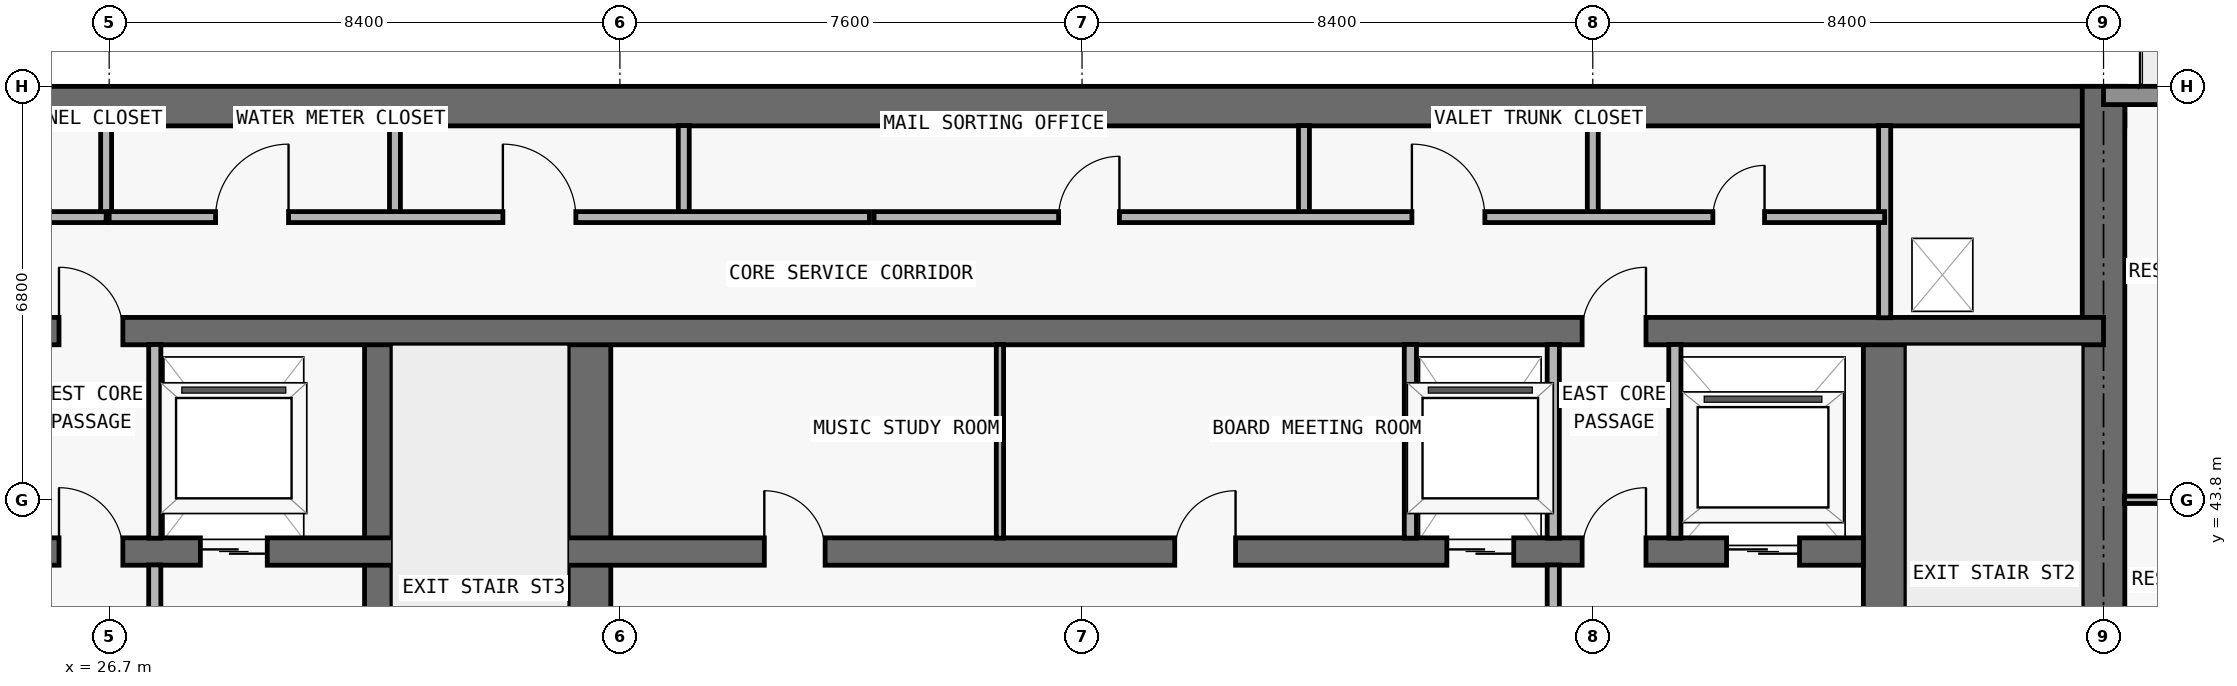
"""IFC4 building model, lengths in metres.
Left out: names, types, materials, properties, quantities, classifications, styles, units other than length and angle.
Written with IfcOpenShell. Run it as: python <this file> out.ifc"""

import sys

from ifc_helpers import new_model, si_unit, direction, frame, frame_2d, origin, place, context, subcontext, project, spatial, rectangle, extrude, element, fill, save


model = new_model("IFC4")
c1 = context("Model", 3, precision=1e-05, world=origin(), true_north=direction((0.0, 1.0)))
c2 = subcontext(c1, "Body", "Model", "MODEL_VIEW")
j1 = project(units=[si_unit("LENGTHUNIT", "METRE"), si_unit("PLANEANGLEUNIT", "RADIAN")], contexts=[c1])
p1 = place(None, origin())
s1 = spatial("IfcSite", under=j1, at=p1, CompositionType="ELEMENT")
p2 = place(p1, origin())
s2 = spatial("IfcBuilding", under=s1, at=p2, CompositionType="ELEMENT")
p3 = place(p2, frame((0.0, 0.0, 229.8)))
s3 = spatial("IfcBuildingStorey", under=s2, at=p3, CompositionType="ELEMENT", Elevation=229.8)
p4 = place(p3, frame((17.95, 50.275, 0.0), z_axis=(0.0, 0.0, 1.0), x_axis=(1.0, 0.0, 0.0)))
e1 = element("IfcWall", 1, at=p4, inside=s3, PredefinedType="SHEAR", context=c2, shape_type="SweptSolid", body=[
    extrude(rectangle(XDim=41.9, YDim=0.65, at=frame_2d((20.95, 0.0))), origin(), (0.0, 0.0, 1.0), 3.05),
])
p5 = place(p3, frame((59.5, 36.65, 0.0), z_axis=(0.0, 0.0, 1.0), x_axis=(0.0, 1.0, 0.0)))
e2 = element("IfcWall", 2, at=p5, inside=s3, PredefinedType="SHEAR", context=c2, shape_type="SweptSolid", body=[
    extrude(rectangle(XDim=13.95, YDim=0.7, at=frame_2d((6.975, 0.0))), origin(), (0.0, 0.0, 1.0), 3.05),
])
p6 = place(p3, frame((55.9, 37.0, 0.0), z_axis=(0.0, 0.0, 1.0), x_axis=(0.0, 1.0, 0.0)))
e3 = element("IfcWall", 3, at=p6, inside=s3, PredefinedType="SHEAR", context=c2, shape_type="SweptSolid", body=[
    extrude(rectangle(XDim=9.575, YDim=0.7, at=frame_2d((4.788, 0.0))), origin(), (0.0, 0.0, 1.0), 3.05),
])
p7 = place(p6, frame((0.55, 0.0, 0.0)))
e4 = element("IfcOpeningElement", 4, at=p7, cuts=e3, PredefinedType="OPENING", context=c2, shape_type="SweptSolid", body=[
    extrude(rectangle(XDim=1.1, YDim=2.15, at=frame_2d((0.55, 1.075))), frame((0.0, 0.36, 0.0), z_axis=(0.0, -1.0, 0.0), x_axis=(1.0, 0.0, 0.0)), (0.0, 0.0, 1.0), 0.72),
])
p8 = place(p3, frame((31.125, 37.0, 0.0), z_axis=(0.0, 0.0, 1.0), x_axis=(0.0, 1.0, 0.0)))
e5 = element("IfcWall", 5, at=p8, inside=s3, PredefinedType="SHEAR", context=c2, shape_type="SweptSolid", body=[
    extrude(rectangle(XDim=9.575, YDim=0.45, at=frame_2d((4.788, 0.0))), origin(), (0.0, 0.0, 1.0), 3.05),
])
p9 = place(p3, frame((34.6, 37.0, 0.0), z_axis=(0.0, 0.0, 1.0), x_axis=(0.0, 1.0, 0.0)))
e6 = element("IfcWall", 6, at=p9, inside=s3, PredefinedType="SHEAR", context=c2, shape_type="SweptSolid", body=[
    extrude(rectangle(XDim=9.575, YDim=0.7, at=frame_2d((4.788, 0.0))), origin(), (0.0, 0.0, 1.0), 3.05),
])
p10 = place(p3, frame((22.25, 42.95, 0.0), z_axis=(0.0, 0.0, 1.0), x_axis=(1.0, 0.0, 0.0)))
e7 = element("IfcWall", 7, at=p10, inside=s3, PredefinedType="SHEAR", context=c2, shape_type="SweptSolid", body=[
    extrude(rectangle(XDim=33.3, YDim=0.45, at=frame_2d((16.65, 0.0))), origin(), (0.0, 0.0, 1.0), 3.05),
])
p11 = place(p10, frame((1.05, 0.0, 0.0)))
e8 = element("IfcOpeningElement", 8, at=p11, cuts=e7, PredefinedType="OPENING", context=c2, shape_type="SweptSolid", body=[
    extrude(rectangle(XDim=1.2, YDim=2.2, at=frame_2d((0.6, 1.1))), frame((0.0, 0.235, 0.0), z_axis=(0.0, -1.0, 0.0), x_axis=(1.0, 0.0, 0.0)), (0.0, 0.0, 1.0), 0.47),
])
p12 = place(p10, frame((31.05, 0.0, 0.0)))
e9 = element("IfcOpeningElement", 9, at=p12, cuts=e7, PredefinedType="OPENING", context=c2, shape_type="SweptSolid", body=[
    extrude(rectangle(XDim=1.2, YDim=2.2, at=frame_2d((0.6, 1.1))), frame((0.0, 0.235, 0.0), z_axis=(0.0, -1.0, 0.0), x_axis=(1.0, 0.0, 0.0)), (0.0, 0.0, 1.0), 0.47),
])
p13 = place(p10, frame((26.45, 0.0, 0.0)))
e10 = element("IfcOpeningElement", 10, at=p13, cuts=e7, PredefinedType="OPENING", context=c2, shape_type="SweptSolid", body=[
    extrude(rectangle(XDim=1.1, YDim=2.2, at=frame_2d((0.55, 1.1))), frame((0.0, 0.235, 0.0), z_axis=(0.0, -1.0, 0.0), x_axis=(1.0, 0.0, 0.0)), (0.0, 0.0, 1.0), 0.47),
])
p14 = place(p10, frame((5.95, 0.0, 0.0)))
e11 = element("IfcOpeningElement", 11, at=p14, cuts=e7, PredefinedType="OPENING", context=c2, shape_type="SweptSolid", body=[
    extrude(rectangle(XDim=1.1, YDim=2.2, at=frame_2d((0.55, 1.1))), frame((0.0, 0.235, 0.0), z_axis=(0.0, -1.0, 0.0), x_axis=(1.0, 0.0, 0.0)), (0.0, 0.0, 1.0), 0.47),
])
p15 = place(p10, frame((3.625, 0.0, 0.0)))
e12 = element("IfcOpeningElement", 12, at=p15, cuts=e7, PredefinedType="OPENING", context=c2, shape_type="SweptSolid", body=[
    extrude(rectangle(XDim=1.05, YDim=2.15, at=frame_2d((0.525, 1.075))), frame((0.0, 0.235, 0.0), z_axis=(0.0, -1.0, 0.0), x_axis=(1.0, 0.0, 0.0)), (0.0, 0.0, 1.0), 0.47),
])
p16 = place(p10, frame((28.675, 0.0, 0.0)))
e13 = element("IfcOpeningElement", 13, at=p16, cuts=e7, PredefinedType="OPENING", context=c2, shape_type="SweptSolid", body=[
    extrude(rectangle(XDim=1.05, YDim=2.15, at=frame_2d((0.525, 1.075))), frame((0.0, 0.235, 0.0), z_axis=(0.0, -1.0, 0.0), x_axis=(1.0, 0.0, 0.0)), (0.0, 0.0, 1.0), 0.47),
])
p17 = place(p10, frame((15.225, 0.0, 0.0)))
e14 = element("IfcOpeningElement", 14, at=p17, cuts=e7, PredefinedType="OPENING", context=c2, shape_type="SweptSolid", body=[
    extrude(rectangle(XDim=1.0, YDim=2.2, at=frame_2d((0.5, 1.1))), frame((0.0, 0.235, 0.0), z_axis=(0.0, -1.0, 0.0), x_axis=(1.0, 0.0, 0.0)), (0.0, 0.0, 1.0), 0.47),
])
p18 = place(p10, frame((21.975, 0.0, 0.0)))
e15 = element("IfcOpeningElement", 15, at=p18, cuts=e7, PredefinedType="OPENING", context=c2, shape_type="SweptSolid", body=[
    extrude(rectangle(XDim=1.0, YDim=2.2, at=frame_2d((0.5, 1.1))), frame((0.0, 0.235, 0.0), z_axis=(0.0, -1.0, 0.0), x_axis=(1.0, 0.0, 0.0)), (0.0, 0.0, 1.0), 0.47),
])
p19 = place(p3, frame((18.3, 46.575, 0.0), z_axis=(0.0, 0.0, 1.0), x_axis=(1.0, 0.0, 0.0)))
e16 = element("IfcWall", 16, at=p19, inside=s3, PredefinedType="SHEAR", context=c2, shape_type="SweptSolid", body=[
    extrude(rectangle(XDim=41.2, YDim=0.45, at=frame_2d((20.6, 0.0))), origin(), (0.0, 0.0, 1.0), 3.05),
])
p20 = place(p19, frame((7.575, 0.0, 0.0)))
e17 = element("IfcOpeningElement", 17, at=p20, cuts=e16, PredefinedType="OPENING", context=c2, shape_type="SweptSolid", body=[
    extrude(rectangle(XDim=1.05, YDim=2.15, at=frame_2d((0.525, 1.075))), frame((0.0, 0.235, 0.0), z_axis=(0.0, -1.0, 0.0), x_axis=(1.0, 0.0, 0.0)), (0.0, 0.0, 1.0), 0.47),
])
p21 = place(p19, frame((32.625, 0.0, 0.0)))
e18 = element("IfcOpeningElement", 18, at=p21, cuts=e16, PredefinedType="OPENING", context=c2, shape_type="SweptSolid", body=[
    extrude(rectangle(XDim=1.05, YDim=2.15, at=frame_2d((0.525, 1.075))), frame((0.0, 0.235, 0.0), z_axis=(0.0, -1.0, 0.0), x_axis=(1.0, 0.0, 0.0)), (0.0, 0.0, 1.0), 0.47),
])
p22 = place(p3, frame((59.5, 50.45, 0.0), z_axis=(0.0, 0.0, 1.0), x_axis=(1.0, 0.0, 0.0)))
e19 = element("IfcWall", 19, at=p22, inside=s3, PredefinedType="STANDARD", context=c2, shape_type="SweptSolid", body=[
    extrude(rectangle(XDim=6.2, YDim=0.3, at=frame_2d((3.1, 0.0))), origin(), (0.0, 0.0, 1.0), 3.05),
])
p23 = place(p22, frame((2.1, 0.0, 0.0)))
e20 = element("IfcOpeningElement", 20, at=p23, cuts=e19, PredefinedType="OPENING", context=c2, shape_type="SweptSolid", body=[
    extrude(rectangle(XDim=2.0, YDim=2.3, at=frame_2d((1.0, 1.15))), frame((0.0, 0.16, 0.0), z_axis=(0.0, -1.0, 0.0), x_axis=(1.0, 0.0, 0.0)), (0.0, 0.0, 1.0), 0.32),
])
p24 = place(p3, frame((26.65, 48.45, 0.0), z_axis=(0.0, 0.0, 1.0), x_axis=(0.0, 1.0, 0.0)))
e21 = element("IfcWall", 21, at=p24, inside=s3, PredefinedType="PARTITIONING", context=c2, shape_type="SweptSolid", body=[
    extrude(rectangle(XDim=1.505, YDim=0.18, at=frame_2d((0.752, 0.0))), origin(), (0.0, 0.0, 1.0), 3.05),
])
p25 = place(p3, frame((27.45, 37.345, 0.0), z_axis=(0.0, 0.0, 1.0), x_axis=(0.0, 1.0, 0.0)))
e22 = element("IfcWall", 22, at=p25, inside=s3, PredefinedType="PARTITIONING", context=c2, shape_type="SweptSolid", body=[
    extrude(rectangle(XDim=5.385, YDim=0.2, at=frame_2d((2.692, 0.0))), origin(), (0.0, 0.0, 1.0), 3.05),
])
p26 = place(p3, frame((27.45, 43.17, 0.0), z_axis=(0.0, 0.0, 1.0), x_axis=(0.0, 1.0, 0.0)))
e23 = element("IfcWall", 23, at=p26, inside=s3, PredefinedType="PARTITIONING", context=c2, shape_type="SweptSolid", body=[
    extrude(rectangle(XDim=3.185, YDim=0.2, at=frame_2d((1.593, 0.0))), origin(), (0.0, 0.0, 1.0), 3.05),
])
for number, where, z_axis, x_axis in (
    (24, (31.4, 48.45, 0.0), (0.0, 0.0, 1.0), (0.0, 1.0, 0.0)),
    (25, (36.15, 48.45, 0.0), (0.0, 0.0, 1.0), (0.0, 1.0, 0.0)),
):
    element("IfcWall", number, at=place(p3, frame(where, z_axis=z_axis, x_axis=x_axis)), inside=s3, PredefinedType="PARTITIONING", context=c2, shape_type="SweptSolid", body=[
        extrude(rectangle(XDim=1.505, YDim=0.18, at=frame_2d((0.752, 0.0))), origin(), (0.0, 0.0, 1.0), 3.05),
    ])
p27 = place(p3, frame((41.35, 43.17, 0.0), z_axis=(0.0, 0.0, 1.0), x_axis=(0.0, 1.0, 0.0)))
e26 = element("IfcWall", 26, at=p27, inside=s3, PredefinedType="PARTITIONING", context=c2, shape_type="SweptSolid", body=[
    extrude(rectangle(XDim=3.185, YDim=0.12, at=frame_2d((1.593, 0.0))), origin(), (0.0, 0.0, 1.0), 3.05),
])
p28 = place(p3, frame((46.35, 48.45, 0.0), z_axis=(0.0, 0.0, 1.0), x_axis=(0.0, 1.0, 0.0)))
e27 = element("IfcWall", 27, at=p28, inside=s3, PredefinedType="PARTITIONING", context=c2, shape_type="SweptSolid", body=[
    extrude(rectangle(XDim=1.505, YDim=0.18, at=frame_2d((0.752, 0.0))), origin(), (0.0, 0.0, 1.0), 3.05),
])
p29 = place(p3, frame((48.1, 43.17, 0.0), z_axis=(0.0, 0.0, 1.0), x_axis=(0.0, 1.0, 0.0)))
e28 = element("IfcWall", 28, at=p29, inside=s3, PredefinedType="PARTITIONING", context=c2, shape_type="SweptSolid", body=[
    extrude(rectangle(XDim=3.185, YDim=0.2, at=frame_2d((1.593, 0.0))), origin(), (0.0, 0.0, 1.0), 3.05),
])
p30 = place(p3, frame((50.45, 37.345, 0.0), z_axis=(0.0, 0.0, 1.0), x_axis=(0.0, 1.0, 0.0)))
e29 = element("IfcWall", 29, at=p30, inside=s3, PredefinedType="PARTITIONING", context=c2, shape_type="SweptSolid", body=[
    extrude(rectangle(XDim=5.385, YDim=0.2, at=frame_2d((2.692, 0.0))), origin(), (0.0, 0.0, 1.0), 3.05),
])
p31 = place(p3, frame((50.45, 43.17, 0.0), z_axis=(0.0, 0.0, 1.0), x_axis=(0.0, 1.0, 0.0)))
e30 = element("IfcWall", 30, at=p31, inside=s3, PredefinedType="PARTITIONING", context=c2, shape_type="SweptSolid", body=[
    extrude(rectangle(XDim=3.185, YDim=0.2, at=frame_2d((1.593, 0.0))), origin(), (0.0, 0.0, 1.0), 3.05),
])
p32 = place(p3, frame((51.1, 48.45, 0.0), z_axis=(0.0, 0.0, 1.0), x_axis=(0.0, 1.0, 0.0)))
e31 = element("IfcWall", 31, at=p32, inside=s3, PredefinedType="PARTITIONING", context=c2, shape_type="SweptSolid", body=[
    extrude(rectangle(XDim=1.505, YDim=0.18, at=frame_2d((0.752, 0.0))), origin(), (0.0, 0.0, 1.0), 3.05),
])
p33 = place(p3, frame((52.45, 43.17, 0.0), z_axis=(0.0, 0.0, 1.0), x_axis=(0.0, 1.0, 0.0)))
e32 = element("IfcWall", 32, at=p33, inside=s3, PredefinedType="PARTITIONING", context=c2, shape_type="SweptSolid", body=[
    extrude(rectangle(XDim=3.185, YDim=0.2, at=frame_2d((1.593, 0.0))), origin(), (0.0, 0.0, 1.0), 3.05),
])
p34 = place(p3, frame((55.9, 46.795, 0.0), z_axis=(0.0, 0.0, 1.0), x_axis=(0.0, 1.0, 0.0)))
e33 = element("IfcWall", 33, at=p34, inside=s3, PredefinedType="PARTITIONING", context=c2, shape_type="SweptSolid", body=[
    extrude(rectangle(XDim=3.16, YDim=0.2, at=frame_2d((1.58, 0.0))), origin(), (0.0, 0.0, 1.0), 3.05),
])
p35 = place(p3, frame((59.845, 43.8, 0.0), z_axis=(0.0, 0.0, 1.0), x_axis=(1.0, 0.0, 0.0)))
e34 = element("IfcWall", 34, at=p35, inside=s3, PredefinedType="PARTITIONING", context=c2, shape_type="SweptSolid", body=[
    extrude(rectangle(XDim=9.56, YDim=0.12, at=frame_2d((4.78, 0.0))), origin(), (0.0, 0.0, 1.0), 2.418),
])
p36 = place(p35, frame((3.63, 0.0, 0.0)))
e35 = element("IfcOpeningElement", 35, at=p36, cuts=e34, PredefinedType="OPENING", context=c2, shape_type="SweptSolid", body=[
    extrude(rectangle(XDim=0.9, YDim=2.15, at=frame_2d((0.45, 1.075))), frame((0.0, 0.07, 0.0), z_axis=(0.0, -1.0, 0.0), x_axis=(1.0, 0.0, 0.0)), (0.0, 0.0, 1.0), 0.14),
])
p37 = place(p35, frame((0.728, 0.0, 0.0)))
e36 = element("IfcOpeningElement", 36, at=p37, cuts=e34, PredefinedType="OPENING", context=c2, shape_type="SweptSolid", body=[
    extrude(rectangle(XDim=0.85, YDim=2.1, at=frame_2d((0.425, 1.05))), frame((0.0, 0.07, 0.0), z_axis=(0.0, -1.0, 0.0), x_axis=(1.0, 0.0, 0.0)), (0.0, 0.0, 1.0), 0.14),
])
p38 = place(p3, frame((21.9, 48.45, 0.0), z_axis=(0.0, 0.0, 1.0), x_axis=(1.0, 0.0, 0.0)))
e37 = element("IfcWall", 37, at=p38, inside=s3, PredefinedType="PARTITIONING", context=c2, shape_type="SweptSolid", body=[
    extrude(rectangle(XDim=4.75, YDim=0.18, at=frame_2d((2.375, 0.0))), origin(), (0.0, 0.0, 1.0), 3.05),
])
p39 = place(p38, frame((1.775, 0.0, 0.0)))
e38 = element("IfcOpeningElement", 38, at=p39, cuts=e37, PredefinedType="OPENING", context=c2, shape_type="SweptSolid", body=[
    extrude(rectangle(XDim=1.2, YDim=2.2, at=frame_2d((0.6, 1.1))), frame((0.0, 0.1, 0.0), z_axis=(0.0, -1.0, 0.0), x_axis=(1.0, 0.0, 0.0)), (0.0, 0.0, 1.0), 0.2),
])
p40 = place(p3, frame((26.7, 48.45, 0.0), z_axis=(0.0, 0.0, 1.0), x_axis=(1.0, 0.0, 0.0)))
e39 = element("IfcWall", 39, at=p40, inside=s3, PredefinedType="PARTITIONING", context=c2, shape_type="SweptSolid", body=[
    extrude(rectangle(XDim=12.504, YDim=0.18, at=frame_2d((6.252, 0.0))), origin(), (0.0, 0.0, 1.0), 3.05),
])
p41 = place(p40, frame((1.75, 0.0, 0.0)))
e40 = element("IfcOpeningElement", 40, at=p41, cuts=e39, PredefinedType="OPENING", context=c2, shape_type="SweptSolid", body=[
    extrude(rectangle(XDim=1.2, YDim=2.2, at=frame_2d((0.6, 1.1))), frame((0.0, 0.1, 0.0), z_axis=(0.0, -1.0, 0.0), x_axis=(1.0, 0.0, 0.0)), (0.0, 0.0, 1.0), 0.2),
])
p42 = place(p40, frame((6.475, 0.0, 0.0)))
e41 = element("IfcOpeningElement", 41, at=p42, cuts=e39, PredefinedType="OPENING", context=c2, shape_type="SweptSolid", body=[
    extrude(rectangle(XDim=1.2, YDim=2.2, at=frame_2d((0.6, 1.1))), frame((0.0, 0.1, 0.0), z_axis=(0.0, -1.0, 0.0), x_axis=(1.0, 0.0, 0.0)), (0.0, 0.0, 1.0), 0.2),
])
p43 = place(p3, frame((39.28, 48.45, 0.0), z_axis=(0.0, 0.0, 1.0), x_axis=(1.0, 0.0, 0.0)))
e42 = element("IfcWall", 42, at=p43, inside=s3, PredefinedType="PARTITIONING", context=c2, shape_type="SweptSolid", body=[
    extrude(rectangle(XDim=16.62, YDim=0.18, at=frame_2d((8.31, 0.0))), origin(), (0.0, 0.0, 1.0), 3.05),
])
p44 = place(p43, frame((3.035, 0.0, 0.0)))
e43 = element("IfcOpeningElement", 43, at=p44, cuts=e42, PredefinedType="OPENING", context=c2, shape_type="SweptSolid", body=[
    extrude(rectangle(XDim=1.0, YDim=2.2, at=frame_2d((0.5, 1.1))), frame((0.0, 0.1, 0.0), z_axis=(0.0, -1.0, 0.0), x_axis=(1.0, 0.0, 0.0)), (0.0, 0.0, 1.0), 0.2),
])
p45 = place(p43, frame((8.845, 0.0, 0.0)))
e44 = element("IfcOpeningElement", 44, at=p45, cuts=e42, PredefinedType="OPENING", context=c2, shape_type="SweptSolid", body=[
    extrude(rectangle(XDim=1.2, YDim=2.2, at=frame_2d((0.6, 1.1))), frame((0.0, 0.1, 0.0), z_axis=(0.0, -1.0, 0.0), x_axis=(1.0, 0.0, 0.0)), (0.0, 0.0, 1.0), 0.2),
])
p46 = place(p43, frame((13.795, 0.0, 0.0)))
e45 = element("IfcOpeningElement", 45, at=p46, cuts=e42, PredefinedType="OPENING", context=c2, shape_type="SweptSolid", body=[
    extrude(rectangle(XDim=0.85, YDim=2.1, at=frame_2d((0.425, 1.05))), frame((0.0, 0.1, 0.0), z_axis=(0.0, -1.0, 0.0), x_axis=(1.0, 0.0, 0.0)), (0.0, 0.0, 1.0), 0.2),
])
p47 = place(p12, origin())
e46 = element("IfcDoor", 46, at=p47, inside=s3, OperationType="DOUBLE_DOOR_SLIDING", PredefinedType="DOOR", context=c2, shape_type="SweptSolid", body=[
    extrude(rectangle(XDim=1.2, YDim=2.2, at=frame_2d((0.6, 1.1))), frame((0.0, 0.025, 0.0), z_axis=(0.0, -1.0, 0.0), x_axis=(1.0, 0.0, 0.0)), (0.0, 0.0, 1.0), 0.05),
])
fill(e9, e46)
p48 = place(p13, origin())
e47 = element("IfcDoor", 47, at=p48, inside=s3, OperationType="DOUBLE_DOOR_SLIDING", PredefinedType="DOOR", context=c2, shape_type="SweptSolid", body=[
    extrude(rectangle(XDim=1.1, YDim=2.2, at=frame_2d((0.55, 1.1))), frame((0.0, 0.025, 0.0), z_axis=(0.0, -1.0, 0.0), x_axis=(1.0, 0.0, 0.0)), (0.0, 0.0, 1.0), 0.05),
])
fill(e10, e47)
p49 = place(p14, origin())
e48 = element("IfcDoor", 48, at=p49, inside=s3, OperationType="DOUBLE_DOOR_SLIDING", PredefinedType="DOOR", context=c2, shape_type="SweptSolid", body=[
    extrude(rectangle(XDim=1.1, YDim=2.2, at=frame_2d((0.55, 1.1))), frame((0.0, 0.025, 0.0), z_axis=(0.0, -1.0, 0.0), x_axis=(1.0, 0.0, 0.0)), (0.0, 0.0, 1.0), 0.05),
])
fill(e11, e48)
p50 = place(p15, origin())
e49 = element("IfcDoor", 49, at=p50, inside=s3, OperationType="SINGLE_SWING_LEFT", PredefinedType="DOOR", context=c2, shape_type="SweptSolid", body=[
    extrude(rectangle(XDim=1.05, YDim=2.15, at=frame_2d((0.525, 1.075))), frame((0.0, 0.025, 0.0), z_axis=(0.0, -1.0, 0.0), x_axis=(1.0, 0.0, 0.0)), (0.0, 0.0, 1.0), 0.05),
])
fill(e12, e49)
p51 = place(p16, origin())
e50 = element("IfcDoor", 50, at=p51, inside=s3, OperationType="SINGLE_SWING_RIGHT", PredefinedType="DOOR", context=c2, shape_type="SweptSolid", body=[
    extrude(rectangle(XDim=1.05, YDim=2.15, at=frame_2d((0.525, 1.075))), frame((0.0, 0.025, 0.0), z_axis=(0.0, -1.0, 0.0), x_axis=(1.0, 0.0, 0.0)), (0.0, 0.0, 1.0), 0.05),
])
fill(e13, e50)
p52 = place(p17, origin())
e51 = element("IfcDoor", 51, at=p52, inside=s3, OperationType="SINGLE_SWING_LEFT", PredefinedType="DOOR", context=c2, shape_type="SweptSolid", body=[
    extrude(rectangle(XDim=1.0, YDim=2.2, at=frame_2d((0.5, 1.1))), frame((0.0, 0.025, 0.0), z_axis=(0.0, -1.0, 0.0), x_axis=(1.0, 0.0, 0.0)), (0.0, 0.0, 1.0), 0.05),
])
fill(e14, e51)
p53 = place(p18, origin())
e52 = element("IfcDoor", 52, at=p53, inside=s3, OperationType="SINGLE_SWING_RIGHT", PredefinedType="DOOR", context=c2, shape_type="SweptSolid", body=[
    extrude(rectangle(XDim=1.0, YDim=2.2, at=frame_2d((0.5, 1.1))), frame((0.0, 0.025, 0.0), z_axis=(0.0, -1.0, 0.0), x_axis=(1.0, 0.0, 0.0)), (0.0, 0.0, 1.0), 0.05),
])
fill(e15, e52)
p54 = place(p20, origin())
e53 = element("IfcDoor", 53, at=p54, inside=s3, OperationType="SINGLE_SWING_LEFT", PredefinedType="DOOR", context=c2, shape_type="SweptSolid", body=[
    extrude(rectangle(XDim=1.05, YDim=2.15, at=frame_2d((0.525, 1.075))), frame((0.0, 0.025, 0.0), z_axis=(0.0, -1.0, 0.0), x_axis=(1.0, 0.0, 0.0)), (0.0, 0.0, 1.0), 0.05),
])
fill(e17, e53)
p55 = place(p21, origin())
e54 = element("IfcDoor", 54, at=p55, inside=s3, OperationType="SINGLE_SWING_RIGHT", PredefinedType="DOOR", context=c2, shape_type="SweptSolid", body=[
    extrude(rectangle(XDim=1.05, YDim=2.15, at=frame_2d((0.525, 1.075))), frame((0.0, 0.025, 0.0), z_axis=(0.0, -1.0, 0.0), x_axis=(1.0, 0.0, 0.0)), (0.0, 0.0, 1.0), 0.05),
])
fill(e18, e54)
p56 = place(p41, origin())
e55 = element("IfcDoor", 55, at=p56, inside=s3, OperationType="SINGLE_SWING_RIGHT", PredefinedType="DOOR", context=c2, shape_type="SweptSolid", body=[
    extrude(rectangle(XDim=1.2, YDim=2.2, at=frame_2d((0.6, 1.1))), frame((0.0, 0.025, 0.0), z_axis=(0.0, -1.0, 0.0), x_axis=(1.0, 0.0, 0.0)), (0.0, 0.0, 1.0), 0.05),
])
fill(e40, e55)
p57 = place(p42, origin())
e56 = element("IfcDoor", 56, at=p57, inside=s3, OperationType="SINGLE_SWING_LEFT", PredefinedType="DOOR", context=c2, shape_type="SweptSolid", body=[
    extrude(rectangle(XDim=1.2, YDim=2.2, at=frame_2d((0.6, 1.1))), frame((0.0, 0.025, 0.0), z_axis=(0.0, -1.0, 0.0), x_axis=(1.0, 0.0, 0.0)), (0.0, 0.0, 1.0), 0.05),
])
fill(e41, e56)
p58 = place(p44, origin())
e57 = element("IfcDoor", 57, at=p58, inside=s3, OperationType="SINGLE_SWING_RIGHT", PredefinedType="DOOR", context=c2, shape_type="SweptSolid", body=[
    extrude(rectangle(XDim=1.0, YDim=2.2, at=frame_2d((0.5, 1.1))), frame((0.0, 0.025, 0.0), z_axis=(0.0, -1.0, 0.0), x_axis=(1.0, 0.0, 0.0)), (0.0, 0.0, 1.0), 0.05),
])
fill(e43, e57)
p59 = place(p45, origin())
e58 = element("IfcDoor", 58, at=p59, inside=s3, OperationType="SINGLE_SWING_LEFT", PredefinedType="DOOR", context=c2, shape_type="SweptSolid", body=[
    extrude(rectangle(XDim=1.2, YDim=2.2, at=frame_2d((0.6, 1.1))), frame((0.0, 0.025, 0.0), z_axis=(0.0, -1.0, 0.0), x_axis=(1.0, 0.0, 0.0)), (0.0, 0.0, 1.0), 0.05),
])
fill(e44, e58)
p60 = place(p46, origin())
e59 = element("IfcDoor", 59, at=p60, inside=s3, OperationType="SINGLE_SWING_RIGHT", PredefinedType="DOOR", context=c2, shape_type="SweptSolid", body=[
    extrude(rectangle(XDim=0.85, YDim=2.1, at=frame_2d((0.425, 1.05))), frame((0.0, 0.025, 0.0), z_axis=(0.0, -1.0, 0.0), x_axis=(1.0, 0.0, 0.0)), (0.0, 0.0, 1.0), 0.05),
])
fill(e45, e59)
save(model, sys.argv[1])
